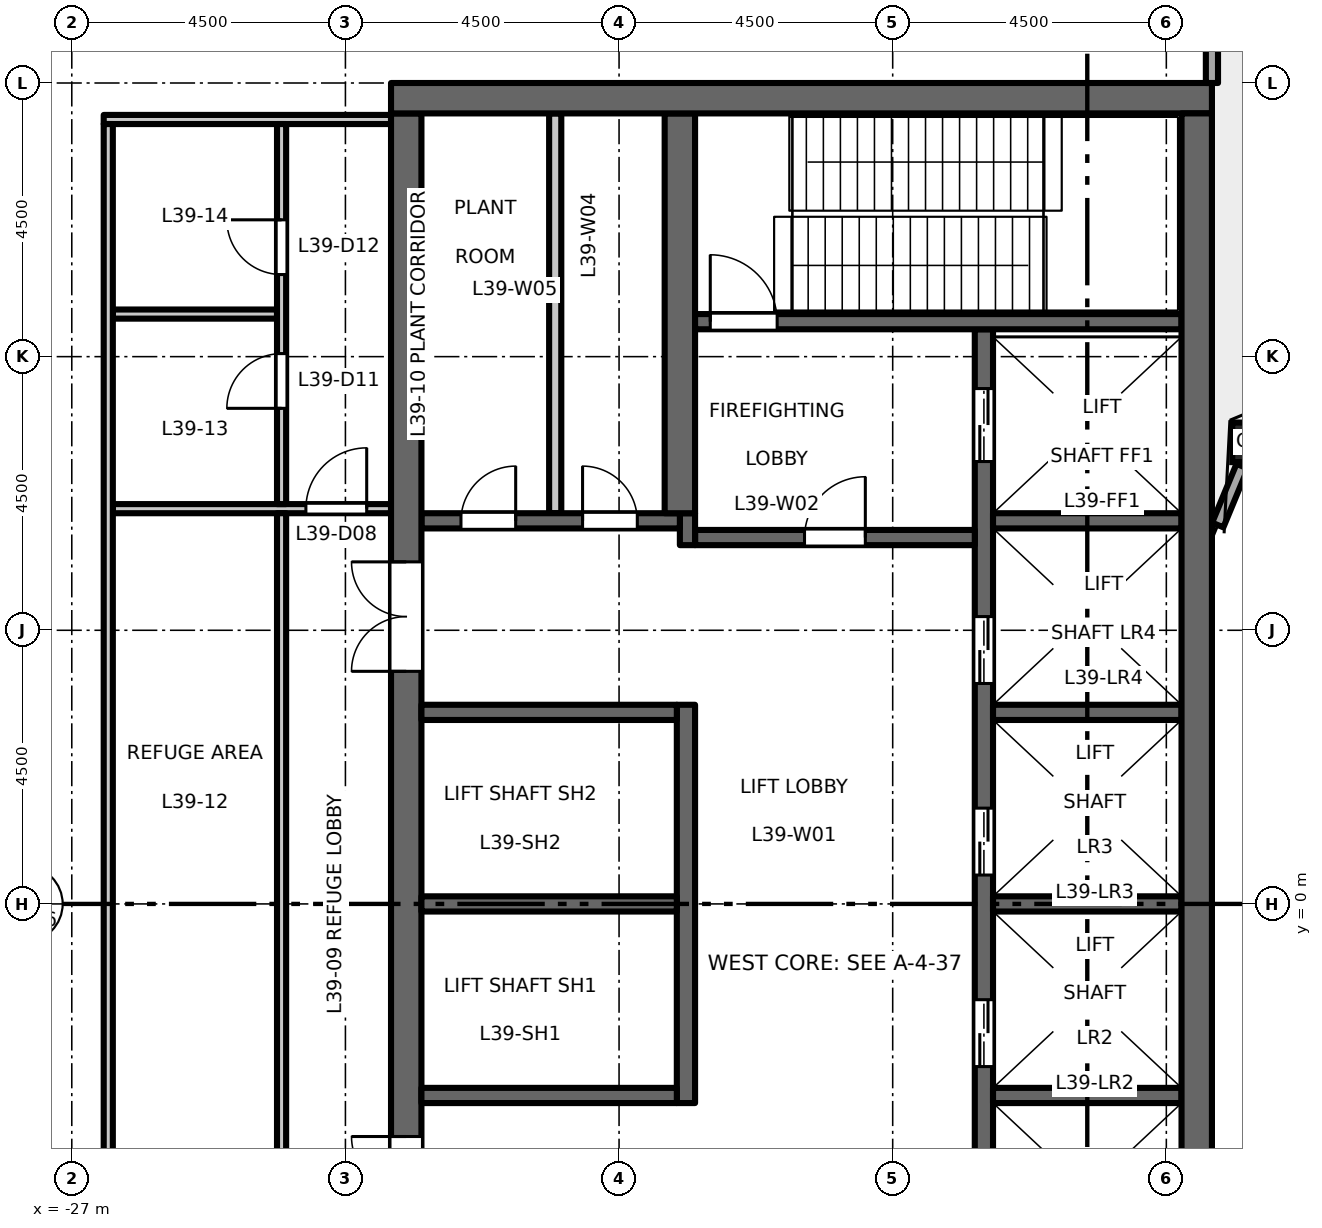
"""IFC4 building model, lengths in metres.
Left out: names, types, materials, properties, quantities, classifications, styles, units other than length and angle.
Written with IfcOpenShell. Run it as: python <this file> out.ifc"""

import sys

from ifc_helpers import new_model, si_unit, direction, frame, frame_2d, origin, origin_2d, place, context, subcontext, project, spatial, rectangle, hollow_rectangle, extrude, element, fill, save


model = new_model("IFC4")
c1 = context("Model", 3, precision=1e-05, world=origin(), true_north=direction((0.0, 1.0)))
c2 = subcontext(c1, "Body", "Model", "MODEL_VIEW")
j1 = project(units=[si_unit("LENGTHUNIT", "METRE"), si_unit("PLANEANGLEUNIT", "RADIAN")], contexts=[c1])
p1 = place(None, origin())
s1 = spatial("IfcSite", under=j1, at=p1, CompositionType="ELEMENT")
p2 = place(p1, origin())
s2 = spatial("IfcBuilding", under=s1, at=p2, CompositionType="ELEMENT")
p3 = place(p2, frame((0.0, 0.0, 181.2)))
s3 = spatial("IfcBuildingStorey", under=s2, at=p3, CompositionType="ELEMENT", Elevation=181.2)
p4 = place(p3, frame((-7.591, 7.591, 0.0), z_axis=(0.0, 0.0, 1.0), x_axis=(1.0, 0.0, 0.0)))
e1 = element("IfcColumn", 1, at=p4, inside=s3, PredefinedType="COLUMN", context=c2, shape_type="SweptSolid", body=[
    extrude(hollow_rectangle(XDim=0.65, YDim=0.65, WallThickness=0.036, at=origin_2d()), origin(), (0.0, 0.0, 1.0), 6.0),
])
p5 = place(p3, frame((-12.0, -9.45, 0.0), z_axis=(0.0, 0.0, 1.0), x_axis=(0.0, 1.0, 0.0)))
e2 = element("IfcWall", 2, at=p5, inside=s3, PredefinedType="SHEAR", context=c2, shape_type="SweptSolid", body=[
    extrude(rectangle(XDim=18.9, YDim=0.3, at=frame_2d((9.45, 0.0))), origin(), (0.0, 0.0, 1.0), 5.8),
])
p6 = place(p5, frame((3.625, 0.0, 0.0)))
e3 = element("IfcOpeningElement", 3, at=p6, cuts=e2, PredefinedType="OPENING", context=c2, shape_type="SweptSolid", body=[
    extrude(rectangle(XDim=1.1, YDim=2.1, at=frame_2d((0.55, 1.05))), frame((0.0, 0.16, 0.0), z_axis=(0.0, -1.0, 0.0), x_axis=(1.0, 0.0, 0.0)), (0.0, 0.0, 1.0), 0.32),
])
p7 = place(p5, frame((6.775, 0.0, 0.0)))
e4 = element("IfcOpeningElement", 4, at=p7, cuts=e2, PredefinedType="OPENING", context=c2, shape_type="SweptSolid", body=[
    extrude(rectangle(XDim=1.1, YDim=2.1, at=frame_2d((0.55, 1.05))), frame((0.0, 0.16, 0.0), z_axis=(0.0, -1.0, 0.0), x_axis=(1.0, 0.0, 0.0)), (0.0, 0.0, 1.0), 0.32),
])
p8 = place(p5, frame((9.925, 0.0, 0.0)))
e5 = element("IfcOpeningElement", 5, at=p8, cuts=e2, PredefinedType="OPENING", context=c2, shape_type="SweptSolid", body=[
    extrude(rectangle(XDim=1.1, YDim=2.1, at=frame_2d((0.55, 1.05))), frame((0.0, 0.16, 0.0), z_axis=(0.0, -1.0, 0.0), x_axis=(1.0, 0.0, 0.0)), (0.0, 0.0, 1.0), 0.32),
])
p9 = place(p5, frame((13.075, 0.0, 0.0)))
e6 = element("IfcOpeningElement", 6, at=p9, cuts=e2, PredefinedType="OPENING", context=c2, shape_type="SweptSolid", body=[
    extrude(rectangle(XDim=1.1, YDim=2.1, at=frame_2d((0.55, 1.05))), frame((0.0, 0.16, 0.0), z_axis=(0.0, -1.0, 0.0), x_axis=(1.0, 0.0, 0.0)), (0.0, 0.0, 1.0), 0.32),
])
p10 = place(p5, frame((16.725, 0.0, 0.0)))
e7 = element("IfcOpeningElement", 7, at=p10, cuts=e2, PredefinedType="OPENING", context=c2, shape_type="SweptSolid", body=[
    extrude(rectangle(XDim=1.2, YDim=2.1, at=frame_2d((0.6, 1.05))), frame((0.0, 0.16, 0.0), z_axis=(0.0, -1.0, 0.0), x_axis=(1.0, 0.0, 0.0)), (0.0, 0.0, 1.0), 0.32),
])
p11 = place(p5, frame((0.975, 0.0, 0.0)))
e8 = element("IfcOpeningElement", 8, at=p11, cuts=e2, PredefinedType="OPENING", context=c2, shape_type="SweptSolid", body=[
    extrude(rectangle(XDim=1.2, YDim=2.1, at=frame_2d((0.6, 1.05))), frame((0.0, 0.16, 0.0), z_axis=(0.0, -1.0, 0.0), x_axis=(1.0, 0.0, 0.0)), (0.0, 0.0, 1.0), 0.32),
])
p12 = place(p3, frame((-12.15, 6.025, 0.0), z_axis=(0.0, 0.0, 1.0), x_axis=(-1.0, 0.0, 0.0)))
e9 = element("IfcWall", 9, at=p12, inside=s3, PredefinedType="SHEAR", context=c2, shape_type="SweptSolid", body=[
    extrude(rectangle(XDim=4.6, YDim=0.25, at=frame_2d((2.3, 0.0))), origin(), (0.0, 0.0, 1.0), 5.8),
])
p13 = place(p12, frame((1.8, 0.0, 0.0)))
e10 = element("IfcOpeningElement", 10, at=p13, cuts=e9, PredefinedType="OPENING", context=c2, shape_type="SweptSolid", body=[
    extrude(rectangle(XDim=1.0, YDim=2.1, at=frame_2d((0.5, 1.05))), frame((0.0, 0.135, 0.0), z_axis=(0.0, -1.0, 0.0), x_axis=(1.0, 0.0, 0.0)), (0.0, 0.0, 1.0), 0.27),
])
p14 = place(p3, frame((-16.875, 5.9, 0.0), z_axis=(0.0, 0.0, 1.0), x_axis=(0.0, 1.0, 0.0)))
e11 = element("IfcWall", 11, at=p14, inside=s3, PredefinedType="SHEAR", context=c2, shape_type="SweptSolid", body=[
    extrude(rectangle(XDim=0.525, YDim=0.25, at=frame_2d((0.263, 0.0))), origin(), (0.0, 0.0, 1.0), 5.8),
])
p15 = place(p3, frame((-17.0, 6.3, 0.0), z_axis=(0.0, 0.0, 1.0), x_axis=(-1.0, 0.0, 0.0)))
e12 = element("IfcWall", 12, at=p15, inside=s3, PredefinedType="SHEAR", context=c2, shape_type="SweptSolid", body=[
    extrude(rectangle(XDim=4.25, YDim=0.25, at=frame_2d((2.125, 0.0))), origin(), (0.0, 0.0, 1.0), 5.8),
])
p16 = place(p15, frame((0.7, 0.0, 0.0)))
e13 = element("IfcOpeningElement", 13, at=p16, cuts=e12, PredefinedType="OPENING", context=c2, shape_type="SweptSolid", body=[
    extrude(rectangle(XDim=0.9, YDim=2.1, at=frame_2d((0.45, 1.05))), frame((0.0, 0.135, 0.0), z_axis=(0.0, -1.0, 0.0), x_axis=(1.0, 0.0, 0.0)), (0.0, 0.0, 1.0), 0.27),
])
p17 = place(p15, frame((2.7, 0.0, 0.0)))
e14 = element("IfcOpeningElement", 14, at=p17, cuts=e12, PredefinedType="OPENING", context=c2, shape_type="SweptSolid", body=[
    extrude(rectangle(XDim=0.9, YDim=2.1, at=frame_2d((0.45, 1.05))), frame((0.0, 0.135, 0.0), z_axis=(0.0, -1.0, 0.0), x_axis=(1.0, 0.0, 0.0)), (0.0, 0.0, 1.0), 0.27),
])
p18 = place(p3, frame((-21.5, -13.0, 0.0), z_axis=(0.0, 0.0, 1.0), x_axis=(0.0, 1.0, 0.0)))
e15 = element("IfcWall", 15, at=p18, inside=s3, PredefinedType="SHEAR", context=c2, shape_type="SweptSolid", body=[
    extrude(rectangle(XDim=26.0, YDim=0.5, at=frame_2d((13.0, 0.0))), origin(), (0.0, 0.0, 1.0), 5.8),
])
p19 = place(p18, frame((16.825, 0.0, 0.0)))
e16 = element("IfcOpeningElement", 16, at=p19, cuts=e15, PredefinedType="OPENING", context=c2, shape_type="SweptSolid", body=[
    extrude(rectangle(XDim=1.8, YDim=2.1, at=frame_2d((0.9, 1.05))), frame((0.0, 0.26, 0.0), z_axis=(0.0, -1.0, 0.0), x_axis=(1.0, 0.0, 0.0)), (0.0, 0.0, 1.0), 0.52),
])
p20 = place(p18, frame((7.375, 0.0, 0.0)))
e17 = element("IfcOpeningElement", 17, at=p20, cuts=e15, PredefinedType="OPENING", context=c2, shape_type="SweptSolid", body=[
    extrude(rectangle(XDim=1.8, YDim=2.1, at=frame_2d((0.9, 1.05))), frame((0.0, 0.26, 0.0), z_axis=(0.0, -1.0, 0.0), x_axis=(1.0, 0.0, 0.0)), (0.0, 0.0, 1.0), 0.52),
])
p21 = place(p3, frame((-19.05, 6.425, 0.0), z_axis=(0.0, 0.0, 1.0), x_axis=(0.0, 1.0, 0.0)))
e18 = element("IfcWall", 18, at=p21, inside=s3, PredefinedType="PARTITIONING", context=c2, shape_type="SweptSolid", body=[
    extrude(rectangle(XDim=6.575, YDim=0.2, at=frame_2d((3.288, 0.0))), origin(), (0.0, 0.0, 1.0), 5.8),
])
p22 = place(p3, frame((-16.9, -3.275, 0.0), z_axis=(0.0, 0.0, 1.0), x_axis=(0.0, 1.0, 0.0)))
e19 = element("IfcWall", 19, at=p22, inside=s3, PredefinedType="SHEAR", context=c2, shape_type="SweptSolid", body=[
    extrude(rectangle(XDim=6.55, YDim=0.3, at=frame_2d((3.275, 0.0))), origin(), (0.0, 0.0, 1.0), 5.8),
])
for number, where, z_axis, x_axis in (
    (20, (-17.05, 0.0, 0.0), (0.0, 0.0, 1.0), (-1.0, 0.0, 0.0)),
    (21, (-17.05, 3.15, 0.0), (0.0, 0.0, 1.0), (-1.0, 0.0, 0.0)),
    (22, (-17.05, -3.15, 0.0), (0.0, 0.0, 1.0), (-1.0, 0.0, 0.0)),
):
    element("IfcWall", number, at=place(p3, frame(where, z_axis=z_axis, x_axis=x_axis)), inside=s3, PredefinedType="SHEAR", context=c2, shape_type="SweptSolid", body=[
        extrude(rectangle(XDim=4.2, YDim=0.25, at=frame_2d((2.1, 0.0))), origin(), (0.0, 0.0, 1.0), 5.8),
    ])
p23 = place(p3, frame((-17.0, 6.425, 0.0), z_axis=(0.0, 0.0, 1.0), x_axis=(0.0, 1.0, 0.0)))
e23 = element("IfcWall", 23, at=p23, inside=s3, PredefinedType="SHEAR", context=c2, shape_type="SweptSolid", body=[
    extrude(rectangle(XDim=6.575, YDim=0.5, at=frame_2d((3.288, 0.0))), origin(), (0.0, 0.0, 1.0), 5.8),
])
for number, where, z_axis, x_axis in (
    (24, (-8.75, 0.0, 0.0), (0.0, 0.0, 1.0), (-1.0, 0.0, 0.0)),
    (25, (-8.75, 3.15, 0.0), (0.0, 0.0, 1.0), (-1.0, 0.0, 0.0)),
    (26, (-8.75, 6.3, 0.0), (0.0, 0.0, 1.0), (-1.0, 0.0, 0.0)),
    (27, (-8.75, -3.15, 0.0), (0.0, 0.0, 1.0), (-1.0, 0.0, 0.0)),
):
    element("IfcWall", number, at=place(p3, frame(where, z_axis=z_axis, x_axis=x_axis)), inside=s3, PredefinedType="SHEAR", context=c2, shape_type="SweptSolid", body=[
        extrude(rectangle(XDim=3.1, YDim=0.25, at=frame_2d((1.55, 0.0))), origin(), (0.0, 0.0, 1.0), 5.8),
    ])
p24 = place(p3, frame((-8.75, 9.575, 0.0), z_axis=(0.0, 0.0, 1.0), x_axis=(-1.0, 0.0, 0.0)))
e28 = element("IfcWall", 28, at=p24, inside=s3, PredefinedType="SHEAR", context=c2, shape_type="SweptSolid", body=[
    extrude(rectangle(XDim=8.0, YDim=0.25, at=frame_2d((4.0, 0.0))), origin(), (0.0, 0.0, 1.0), 5.8),
])
p25 = place(p24, frame((6.65, 0.0, 0.0)))
e29 = element("IfcOpeningElement", 29, at=p25, cuts=e28, PredefinedType="OPENING", context=c2, shape_type="SweptSolid", body=[
    extrude(rectangle(XDim=1.1, YDim=2.1, at=frame_2d((0.55, 1.05))), frame((0.0, 0.135, 0.0), z_axis=(0.0, -1.0, 0.0), x_axis=(1.0, 0.0, 0.0)), (0.0, 0.0, 1.0), 0.27),
])
p26 = place(p3, frame((-8.25, 13.25, 0.0), z_axis=(0.0, 0.0, 1.0), x_axis=(-1.0, 0.0, 0.0)))
e30 = element("IfcWall", 30, at=p26, inside=s3, PredefinedType="SHEAR", context=c2, shape_type="SweptSolid", body=[
    extrude(rectangle(XDim=13.5, YDim=0.5, at=frame_2d((6.75, 0.0))), origin(), (0.0, 0.0, 1.0), 5.8),
])
p27 = place(p3, frame((-8.5, -13.0, 0.0), z_axis=(0.0, 0.0, 1.0), x_axis=(0.0, 1.0, 0.0)))
e31 = element("IfcWall", 31, at=p27, inside=s3, PredefinedType="SHEAR", context=c2, shape_type="SweptSolid", body=[
    extrude(rectangle(XDim=26.0, YDim=0.5, at=frame_2d((13.0, 0.0))), origin(), (0.0, 0.0, 1.0), 5.8),
])
p28 = place(p3, frame((-7.753, 7.199, 0.0), z_axis=(0.0, 0.0, 1.0), x_axis=(-0.382694858887, -0.923874799408, 0.0)))
e32 = element("IfcWall", 32, at=p28, inside=s3, PredefinedType="STANDARD", context=c2, shape_type="SweptSolid", body=[
    extrude(rectangle(XDim=1.048, YDim=0.2, at=frame_2d((0.524, 0.0))), origin(), (0.0, 0.0, 1.0), 5.368),
])
p29 = place(p3, frame((-8.25, 13.5, 0.0), z_axis=(0.0, 0.0, 1.0), x_axis=(0.0, 1.0, 0.0)))
e33 = element("IfcWall", 33, at=p29, inside=s3, PredefinedType="STANDARD", context=c2, shape_type="SweptSolid", body=[
    extrude(rectangle(XDim=13.115, YDim=0.2, at=frame_2d((6.558, 0.0))), origin(), (0.0, 0.0, 1.0), 5.8),
])
p30 = place(p29, frame((3.087, 0.0, 0.0)))
e34 = element("IfcOpeningElement", 34, at=p30, cuts=e33, PredefinedType="OPENING", context=c2, shape_type="SweptSolid", body=[
    extrude(rectangle(XDim=1.2, YDim=2.4, at=frame_2d((0.6, 1.2))), frame((0.0, 0.11, 0.0), z_axis=(0.0, -1.0, 0.0), x_axis=(1.0, 0.0, 0.0)), (0.0, 0.0, 1.0), 0.22),
])
p31 = place(p29, frame((9.725, 0.0, 0.0)))
e35 = element("IfcOpeningElement", 35, at=p31, cuts=e33, PredefinedType="OPENING", context=c2, shape_type="SweptSolid", body=[
    extrude(rectangle(XDim=1.2, YDim=2.4, at=frame_2d((0.6, 1.2))), frame((0.0, 0.11, 0.0), z_axis=(0.0, -1.0, 0.0), x_axis=(1.0, 0.0, 0.0)), (0.0, 0.0, 1.0), 0.22),
])
p32 = place(p3, frame((-26.325, 6.5, 0.0), z_axis=(0.0, 0.0, 1.0), x_axis=(1.0, 0.0, 0.0)))
e36 = element("IfcWall", 36, at=p32, inside=s3, PredefinedType="PARTITIONING", context=c2, shape_type="SweptSolid", body=[
    extrude(rectangle(XDim=4.575, YDim=0.15, at=frame_2d((2.288, 0.0))), origin(), (0.0, 0.0, 1.0), 5.8),
])
p33 = place(p32, frame((3.175, 0.0, 0.0)))
e37 = element("IfcOpeningElement", 37, at=p33, cuts=e36, PredefinedType="OPENING", context=c2, shape_type="SweptSolid", body=[
    extrude(rectangle(XDim=1.0, YDim=2.1, at=frame_2d((0.5, 1.05))), frame((0.0, 0.085, 0.0), z_axis=(0.0, -1.0, 0.0), x_axis=(1.0, 0.0, 0.0)), (0.0, 0.0, 1.0), 0.17),
])
p34 = place(p3, frame((-26.325, 9.7, 0.0), z_axis=(0.0, 0.0, 1.0), x_axis=(1.0, 0.0, 0.0)))
e38 = element("IfcWall", 38, at=p34, inside=s3, PredefinedType="PARTITIONING", context=c2, shape_type="SweptSolid", body=[
    extrude(rectangle(XDim=2.7, YDim=0.15, at=frame_2d((1.35, 0.0))), origin(), (0.0, 0.0, 1.0), 5.8),
])
p35 = place(p3, frame((-26.475, 12.9, 0.0), z_axis=(0.0, 0.0, 1.0), x_axis=(1.0, 0.0, 0.0)))
e39 = element("IfcWall", 39, at=p35, inside=s3, PredefinedType="PARTITIONING", context=c2, shape_type="SweptSolid", body=[
    extrude(rectangle(XDim=4.725, YDim=0.15, at=frame_2d((2.363, 0.0))), origin(), (0.0, 0.0, 1.0), 5.8),
])
p36 = place(p3, frame((-26.4, -12.825, 0.0), z_axis=(0.0, 0.0, 1.0), x_axis=(0.0, 1.0, 0.0)))
e40 = element("IfcWall", 40, at=p36, inside=s3, PredefinedType="PARTITIONING", context=c2, shape_type="SweptSolid", body=[
    extrude(rectangle(XDim=25.65, YDim=0.15, at=frame_2d((12.825, 0.0))), origin(), (0.0, 0.0, 1.0), 5.8),
])
p37 = place(p3, frame((-23.55, -6.425, 0.0), z_axis=(0.0, 0.0, 1.0), x_axis=(0.0, 1.0, 0.0)))
e41 = element("IfcWall", 41, at=p37, inside=s3, PredefinedType="PARTITIONING", context=c2, shape_type="SweptSolid", body=[
    extrude(rectangle(XDim=12.85, YDim=0.15, at=frame_2d((6.425, 0.0))), origin(), (0.0, 0.0, 1.0), 5.8),
])
p38 = place(p37, frame((1.025, 0.0, 0.0)))
e42 = element("IfcOpeningElement", 42, at=p38, cuts=e41, PredefinedType="OPENING", context=c2, shape_type="SweptSolid", body=[
    extrude(rectangle(XDim=1.0, YDim=2.1, at=frame_2d((0.5, 1.05))), frame((0.0, 0.085, 0.0), z_axis=(0.0, -1.0, 0.0), x_axis=(1.0, 0.0, 0.0)), (0.0, 0.0, 1.0), 0.17),
])
p39 = place(p3, frame((-23.55, 6.575, 0.0), z_axis=(0.0, 0.0, 1.0), x_axis=(0.0, 1.0, 0.0)))
e43 = element("IfcWall", 43, at=p39, inside=s3, PredefinedType="PARTITIONING", context=c2, shape_type="SweptSolid", body=[
    extrude(rectangle(XDim=6.25, YDim=0.15, at=frame_2d((3.125, 0.0))), origin(), (0.0, 0.0, 1.0), 5.8),
])
p40 = place(p39, frame((1.575, 0.0, 0.0)))
e44 = element("IfcOpeningElement", 44, at=p40, cuts=e43, PredefinedType="OPENING", context=c2, shape_type="SweptSolid", body=[
    extrude(rectangle(XDim=0.9, YDim=2.1, at=frame_2d((0.45, 1.05))), frame((0.0, 0.085, 0.0), z_axis=(0.0, -1.0, 0.0), x_axis=(1.0, 0.0, 0.0)), (0.0, 0.0, 1.0), 0.17),
])
p41 = place(p39, frame((3.775, 0.0, 0.0)))
e45 = element("IfcOpeningElement", 45, at=p41, cuts=e43, PredefinedType="OPENING", context=c2, shape_type="SweptSolid", body=[
    extrude(rectangle(XDim=0.9, YDim=2.1, at=frame_2d((0.45, 1.05))), frame((0.0, 0.085, 0.0), z_axis=(0.0, -1.0, 0.0), x_axis=(1.0, 0.0, 0.0)), (0.0, 0.0, 1.0), 0.17),
])
p42 = place(p13, origin())
e46 = element("IfcDoor", 46, at=p42, inside=s3, OperationType="SINGLE_SWING_LEFT", PredefinedType="DOOR", context=c2, shape_type="SweptSolid", body=[
    extrude(rectangle(XDim=1.0, YDim=2.1, at=frame_2d((0.5, 1.05))), frame((0.0, 0.025, 0.0), z_axis=(0.0, -1.0, 0.0), x_axis=(1.0, 0.0, 0.0)), (0.0, 0.0, 1.0), 0.05),
])
fill(e10, e46)
p43 = place(p25, origin())
e47 = element("IfcDoor", 47, at=p43, inside=s3, OperationType="SINGLE_SWING_RIGHT", PredefinedType="DOOR", context=c2, shape_type="SweptSolid", body=[
    extrude(rectangle(XDim=1.1, YDim=2.1, at=frame_2d((0.55, 1.05))), frame((0.0, 0.025, 0.0), z_axis=(0.0, -1.0, 0.0), x_axis=(1.0, 0.0, 0.0)), (0.0, 0.0, 1.0), 0.05),
])
fill(e29, e47)
p44 = place(p19, origin())
e48 = element("IfcDoor", 48, at=p44, inside=s3, OperationType="DOUBLE_DOOR_DOUBLE_SWING", PredefinedType="DOOR", context=c2, shape_type="SweptSolid", body=[
    extrude(rectangle(XDim=1.8, YDim=2.1, at=frame_2d((0.9, 1.05))), frame((0.0, 0.025, 0.0), z_axis=(0.0, -1.0, 0.0), x_axis=(1.0, 0.0, 0.0)), (0.0, 0.0, 1.0), 0.05),
])
fill(e16, e48)
p45 = place(p20, origin())
e49 = element("IfcDoor", 49, at=p45, inside=s3, OperationType="DOUBLE_DOOR_DOUBLE_SWING", PredefinedType="DOOR", context=c2, shape_type="SweptSolid", body=[
    extrude(rectangle(XDim=1.8, YDim=2.1, at=frame_2d((0.9, 1.05))), frame((0.0, 0.025, 0.0), z_axis=(0.0, -1.0, 0.0), x_axis=(1.0, 0.0, 0.0)), (0.0, 0.0, 1.0), 0.05),
])
fill(e17, e49)
p46 = place(p7, origin())
e50 = element("IfcDoor", 50, at=p46, inside=s3, OperationType="DOUBLE_DOOR_SLIDING", PredefinedType="DOOR", context=c2, shape_type="SweptSolid", body=[
    extrude(rectangle(XDim=1.1, YDim=2.1, at=frame_2d((0.55, 1.05))), frame((0.0, 0.025, 0.0), z_axis=(0.0, -1.0, 0.0), x_axis=(1.0, 0.0, 0.0)), (0.0, 0.0, 1.0), 0.05),
])
fill(e4, e50)
p47 = place(p8, origin())
e51 = element("IfcDoor", 51, at=p47, inside=s3, OperationType="DOUBLE_DOOR_SLIDING", PredefinedType="DOOR", context=c2, shape_type="SweptSolid", body=[
    extrude(rectangle(XDim=1.1, YDim=2.1, at=frame_2d((0.55, 1.05))), frame((0.0, 0.025, 0.0), z_axis=(0.0, -1.0, 0.0), x_axis=(1.0, 0.0, 0.0)), (0.0, 0.0, 1.0), 0.05),
])
fill(e5, e51)
p48 = place(p9, origin())
e52 = element("IfcDoor", 52, at=p48, inside=s3, OperationType="DOUBLE_DOOR_SLIDING", PredefinedType="DOOR", context=c2, shape_type="SweptSolid", body=[
    extrude(rectangle(XDim=1.1, YDim=2.1, at=frame_2d((0.55, 1.05))), frame((0.0, 0.025, 0.0), z_axis=(0.0, -1.0, 0.0), x_axis=(1.0, 0.0, 0.0)), (0.0, 0.0, 1.0), 0.05),
])
fill(e6, e52)
p49 = place(p10, origin())
e53 = element("IfcDoor", 53, at=p49, inside=s3, OperationType="DOUBLE_DOOR_SLIDING", PredefinedType="DOOR", context=c2, shape_type="SweptSolid", body=[
    extrude(rectangle(XDim=1.2, YDim=2.1, at=frame_2d((0.6, 1.05))), frame((0.0, 0.025, 0.0), z_axis=(0.0, -1.0, 0.0), x_axis=(1.0, 0.0, 0.0)), (0.0, 0.0, 1.0), 0.05),
])
fill(e7, e53)
p50 = place(p16, origin())
e54 = element("IfcDoor", 54, at=p50, inside=s3, OperationType="SINGLE_SWING_RIGHT", PredefinedType="DOOR", context=c2, shape_type="SweptSolid", body=[
    extrude(rectangle(XDim=0.9, YDim=2.1, at=frame_2d((0.45, 1.05))), frame((0.0, 0.025, 0.0), z_axis=(0.0, -1.0, 0.0), x_axis=(1.0, 0.0, 0.0)), (0.0, 0.0, 1.0), 0.05),
])
fill(e13, e54)
p51 = place(p17, origin())
e55 = element("IfcDoor", 55, at=p51, inside=s3, OperationType="SINGLE_SWING_LEFT", PredefinedType="DOOR", context=c2, shape_type="SweptSolid", body=[
    extrude(rectangle(XDim=0.9, YDim=2.1, at=frame_2d((0.45, 1.05))), frame((0.0, 0.025, 0.0), z_axis=(0.0, -1.0, 0.0), x_axis=(1.0, 0.0, 0.0)), (0.0, 0.0, 1.0), 0.05),
])
fill(e14, e55)
p52 = place(p33, origin())
e56 = element("IfcDoor", 56, at=p52, inside=s3, OperationType="SINGLE_SWING_RIGHT", PredefinedType="DOOR", context=c2, shape_type="SweptSolid", body=[
    extrude(rectangle(XDim=1.0, YDim=2.1, at=frame_2d((0.5, 1.05))), frame((0.0, 0.025, 0.0), z_axis=(0.0, -1.0, 0.0), x_axis=(1.0, 0.0, 0.0)), (0.0, 0.0, 1.0), 0.05),
])
fill(e37, e56)
p53 = place(p40, origin())
e57 = element("IfcDoor", 57, at=p53, inside=s3, OperationType="SINGLE_SWING_LEFT", PredefinedType="DOOR", context=c2, shape_type="SweptSolid", body=[
    extrude(rectangle(XDim=0.9, YDim=2.1, at=frame_2d((0.45, 1.05))), frame((0.0, 0.025, 0.0), z_axis=(0.0, -1.0, 0.0), x_axis=(1.0, 0.0, 0.0)), (0.0, 0.0, 1.0), 0.05),
])
fill(e44, e57)
p54 = place(p41, origin())
e58 = element("IfcDoor", 58, at=p54, inside=s3, OperationType="SINGLE_SWING_RIGHT", PredefinedType="DOOR", context=c2, shape_type="SweptSolid", body=[
    extrude(rectangle(XDim=0.9, YDim=2.1, at=frame_2d((0.45, 1.05))), frame((0.0, 0.025, 0.0), z_axis=(0.0, -1.0, 0.0), x_axis=(1.0, 0.0, 0.0)), (0.0, 0.0, 1.0), 0.05),
])
fill(e45, e58)
save(model, sys.argv[1])
